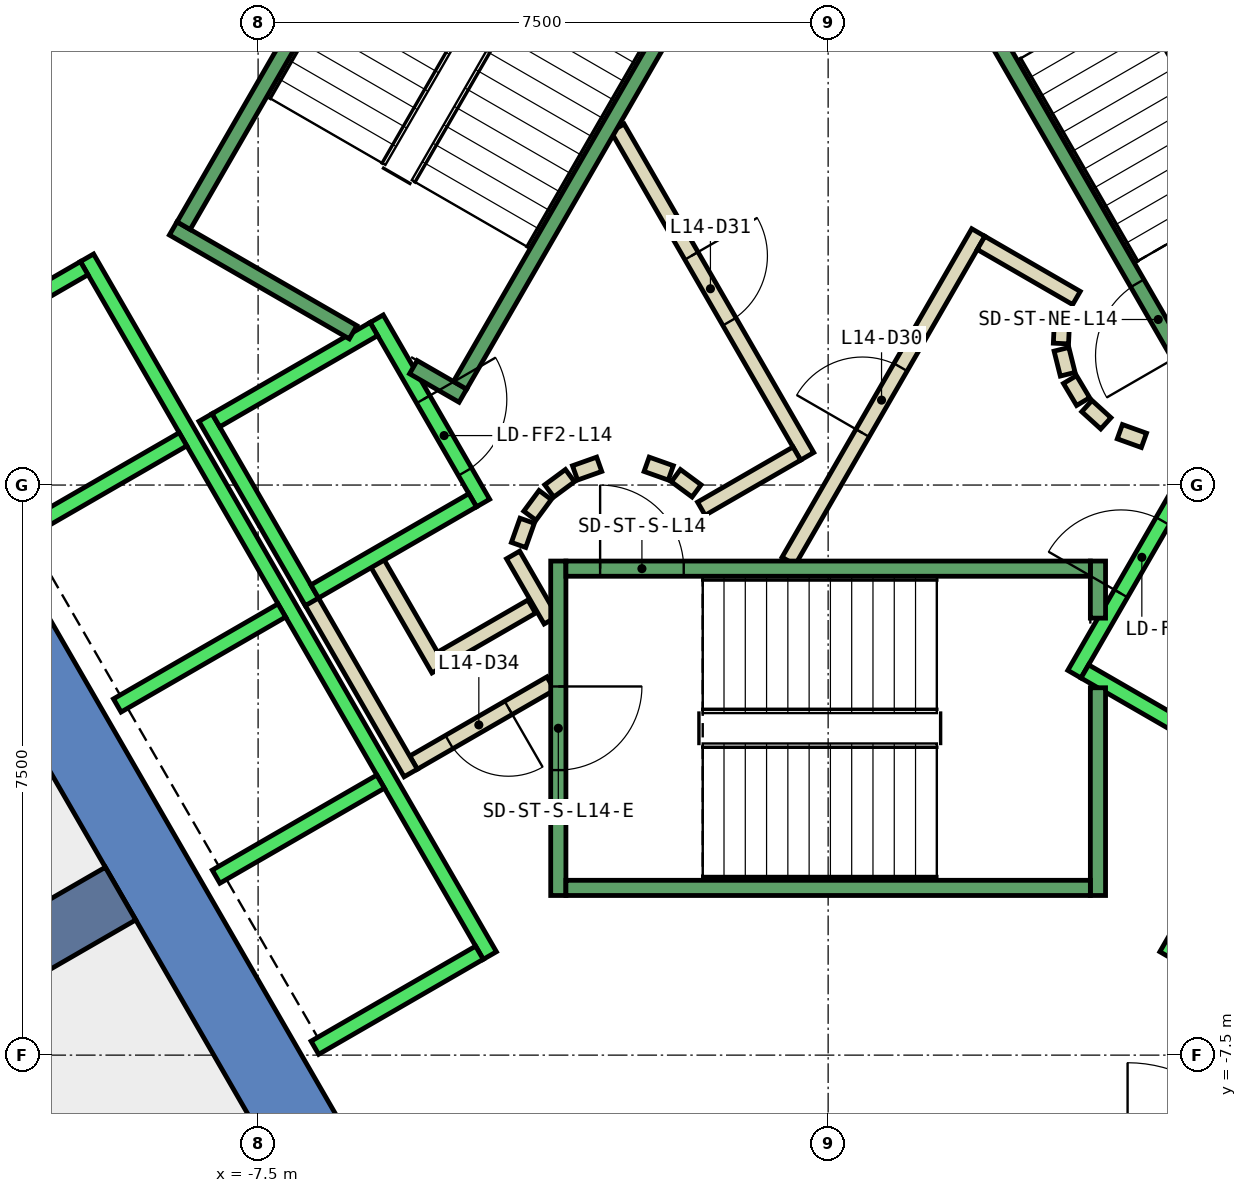
"""IFC4 building model, lengths in metres.
Left out: names, types, materials, properties, quantities, classifications, styles, units other than length and angle.
Written with IfcOpenShell. Run it as: python <this file> out.ifc"""

import sys

from ifc_helpers import new_model, si_unit, direction, frame, frame_2d, origin, place, context, subcontext, project, spatial, polyline, rectangle, outline, extrude, element, fill, save


model = new_model("IFC4")
c1 = context("Model", 3, precision=1e-05, world=origin(), true_north=direction((0.0, 1.0)))
c2 = subcontext(c1, "Body", "Model", "MODEL_VIEW")
j1 = project(units=[si_unit("LENGTHUNIT", "METRE"), si_unit("PLANEANGLEUNIT", "RADIAN")], contexts=[c1])
p1 = place(None, origin())
s1 = spatial("IfcSite", under=j1, at=p1, CompositionType="ELEMENT")
p2 = place(p1, origin())
s2 = spatial("IfcBuilding", under=s1, at=p2, CompositionType="ELEMENT")
p3 = place(p2, frame((0.0, 0.0, 68.6)))
s3 = spatial("IfcBuildingStorey", under=s2, at=p3, CompositionType="ELEMENT", Elevation=68.6)
p4 = place(p3, frame((0.0, 0.0, -0.4)))
e1 = element("IfcWall", 1, at=p4, inside=s3, PredefinedType="SHEAR", context=c2, shape_type="SweptSolid", body=[
    extrude(outline(polyline([(-12.267, 5.252), (-11.402, 4.752), (-6.351, 13.5), (-6.928, 14.5), (-12.267, 5.252)])), origin(), (0.0, 0.0, 1.0), 4.2),
])
p5 = place(p3, frame((0.0, 0.0, -0.4)))
e2 = element("IfcWall", 2, at=p5, inside=s3, PredefinedType="SHEAR", context=c2, shape_type="SweptSolid", body=[
    extrude(outline(polyline([(-13.856, 2.5), (-6.928, -9.5), (-6.351, -8.5), (-12.702, 2.5), (-13.856, 2.5)])), origin(), (0.0, 0.0, 1.0), 4.2),
])
p6 = place(p3, frame((-9.31, -5.375, -0.4), z_axis=(0.0, 0.0, 1.0), x_axis=(-0.866017533419, -0.500013631625, 0.0)))
e3 = element("IfcWall", 3, at=p6, inside=s3, PredefinedType="SHEAR", context=c2, shape_type="SweptSolid", body=[
    extrude(rectangle(XDim=9.0, YDim=0.8, at=frame_2d((4.5, 0.0))), origin(), (0.0, 0.0, 1.0), 4.2),
])
p7 = place(p3, frame((-3.9, -1.599, 0.0), z_axis=(0.0, 0.0, 1.0), x_axis=(-0.865969445389, -0.500096910261, 0.0)))
e4 = element("IfcWall", 4, at=p7, inside=s3, PredefinedType="PARTITIONING", context=c2, shape_type="SweptSolid", body=[
    extrude(rectangle(XDim=1.373, YDim=0.2, at=frame_2d((0.687, 0.0))), origin(), (0.0, 0.0, 1.0), 3.8),
])
p8 = place(p3, frame((-5.126, -2.422, 0.0), z_axis=(0.0, 0.0, 1.0), x_axis=(-0.500062241894, 0.865989465428, 0.0)))
e5 = element("IfcWall", 5, at=p8, inside=s3, PredefinedType="PARTITIONING", context=c2, shape_type="SweptSolid", body=[
    extrude(rectangle(XDim=1.7, YDim=0.2, at=frame_2d((0.85, 0.0))), origin(), (0.0, 0.0, 1.0), 3.8),
])
p9 = place(p3, frame((-3.65, -2.61, 0.0), z_axis=(0.0, 0.0, 1.0), x_axis=(-0.866072462134, -0.499918483688, 0.0)))
e6 = element("IfcWall", 6, at=p9, inside=s3, PredefinedType="PARTITIONING", context=c2, shape_type="SweptSolid", body=[
    extrude(rectangle(XDim=2.084, YDim=0.2, at=frame_2d((1.042, 0.0))), origin(), (0.0, 0.0, 1.0), 3.8),
])
p10 = place(p9, frame((0.642, 0.0, 0.0)))
e7 = element("IfcOpeningElement", 7, at=p10, cuts=e6, PredefinedType="OPENING", context=c2, shape_type="SweptSolid", body=[
    extrude(rectangle(XDim=0.9, YDim=2.1, at=frame_2d((0.45, 1.05))), frame((0.0, 0.11, 0.0), z_axis=(0.0, -1.0, 0.0), x_axis=(1.0, 0.0, 0.0)), (0.0, 0.0, 1.0), 0.22),
])
p11 = place(p3, frame((-5.492, -3.788, 0.0), z_axis=(0.0, 0.0, 1.0), x_axis=(-0.500008949224, 0.866020236886, 0.0)))
e8 = element("IfcWall", 8, at=p11, inside=s3, PredefinedType="PARTITIONING", context=c2, shape_type="SweptSolid", body=[
    extrude(rectangle(XDim=2.68, YDim=0.2, at=frame_2d((1.34, 0.0))), origin(), (0.0, 0.0, 1.0), 3.8),
])
p12 = place(p3, frame((-4.145, -0.92, 0.0), z_axis=(0.0, 0.0, 1.0), x_axis=(0.499743786207, -0.866173278362, 0.0)))
e9 = element("IfcWall", 9, at=p12, inside=s3, PredefinedType="PARTITIONING", context=c2, shape_type="SweptSolid", body=[
    extrude(rectangle(XDim=0.991, YDim=0.2, at=frame_2d((0.495, 0.0))), origin(), (0.0, 0.0, 1.0), 3.8),
])
p13 = place(p3, frame((-0.52, -1.0, 0.0), z_axis=(0.0, 0.0, 1.0), x_axis=(0.50011622646, 0.865958290007, 0.0)))
e10 = element("IfcWall", 10, at=p13, inside=s3, PredefinedType="PARTITIONING", context=c2, shape_type="SweptSolid", body=[
    extrude(rectangle(XDim=4.991, YDim=0.2, at=frame_2d((2.496, 0.0))), origin(), (0.0, 0.0, 1.0), 3.8),
])
p14 = place(p13, frame((1.945, 0.0, 0.0)))
e11 = element("IfcOpeningElement", 11, at=p14, cuts=e10, PredefinedType="OPENING", context=c2, shape_type="SweptSolid", body=[
    extrude(rectangle(XDim=1.0, YDim=2.1, at=frame_2d((0.5, 1.05))), frame((0.0, 0.11, 0.0), z_axis=(0.0, -1.0, 0.0), x_axis=(1.0, 0.0, 0.0)), (0.0, 0.0, 1.0), 0.22),
])
p15 = place(p3, frame((2.012, 3.186, 0.0), z_axis=(0.0, 0.0, 1.0), x_axis=(0.865891012941, -0.500232699559, 0.0)))
e12 = element("IfcWall", 12, at=p15, inside=s3, PredefinedType="PARTITIONING", context=c2, shape_type="SweptSolid", body=[
    extrude(rectangle(XDim=1.449, YDim=0.2, at=frame_2d((0.725, 0.0))), origin(), (0.0, 0.0, 1.0), 3.8),
])
p16 = place(p3, frame((3.079, 2.199, 0.0), z_axis=(0.0, 0.0, 1.0), x_axis=(-0.047771483479, -0.998858290933, 0.0)))
e13 = element("IfcWall", 13, at=p16, inside=s3, PredefinedType="PARTITIONING", context=c2, shape_type="SweptSolid", body=[
    extrude(rectangle(XDim=0.337, YDim=0.2, at=frame_2d((0.169, 0.0))), origin(), (0.0, 0.0, 1.0), 3.8),
])
p17 = place(p3, frame((3.07, 1.786, 0.0), z_axis=(0.0, 0.0, 1.0), x_axis=(0.242705583207, -0.970099994784, 0.0)))
e14 = element("IfcWall", 14, at=p17, inside=s3, PredefinedType="PARTITIONING", context=c2, shape_type="SweptSolid", body=[
    extrude(rectangle(XDim=0.338, YDim=0.2, at=frame_2d((0.169, 0.0))), origin(), (0.0, 0.0, 1.0), 3.8),
])
for number, where, z_axis, x_axis in (
    (15, (3.182, 1.388, 0.0), (0.0, 0.0, 1.0), (0.512, -0.859, 0.0)),
    (16, (3.404, 1.039, 0.0), (0.0, 0.0, 1.0), (0.74, -0.672, 0.0)),
):
    element("IfcWall", number, at=place(p3, frame(where, z_axis=z_axis, x_axis=x_axis)), inside=s3, PredefinedType="PARTITIONING", context=c2, shape_type="SweptSolid", body=[
        extrude(rectangle(XDim=0.338, YDim=0.2, at=frame_2d((0.169, 0.0))), origin(), (0.0, 0.0, 1.0), 3.8),
    ])
p18 = place(p3, frame((3.838, 0.702, 0.0), z_axis=(0.0, 0.0, 1.0), x_axis=(0.941035081519, -0.338308993895, 0.0)))
e17 = element("IfcWall", 17, at=p18, inside=s3, PredefinedType="PARTITIONING", context=c2, shape_type="SweptSolid", body=[
    extrude(rectangle(XDim=0.337, YDim=0.2, at=frame_2d((0.168, 0.0))), origin(), (0.0, 0.0, 1.0), 3.8),
])
p19 = place(p3, frame((-2.771, 4.7, 0.0), z_axis=(0.0, 0.0, 1.0), x_axis=(0.499969479948, -0.866043023828, 0.0)))
e18 = element("IfcWall", 18, at=p19, inside=s3, PredefinedType="PARTITIONING", context=c2, shape_type="SweptSolid", body=[
    extrude(rectangle(XDim=4.99, YDim=0.2, at=frame_2d((2.495, 0.0))), origin(), (0.0, 0.0, 1.0), 3.8),
])
p20 = place(p19, frame((1.945, 0.0, 0.0)))
e19 = element("IfcOpeningElement", 19, at=p20, cuts=e18, PredefinedType="OPENING", context=c2, shape_type="SweptSolid", body=[
    extrude(rectangle(XDim=1.0, YDim=2.1, at=frame_2d((0.5, 1.05))), frame((0.0, 0.11, 0.0), z_axis=(0.0, -1.0, 0.0), x_axis=(1.0, 0.0, 0.0)), (0.0, 0.0, 1.0), 0.22),
])
p21 = place(p3, frame((-0.412, 0.414, 0.0), z_axis=(0.0, 0.0, 1.0), x_axis=(-0.866017369001, -0.500013916395, 0.0)))
e20 = element("IfcWall", 20, at=p21, inside=s3, PredefinedType="PARTITIONING", context=c2, shape_type="SweptSolid", body=[
    extrude(rectangle(XDim=1.45, YDim=0.2, at=frame_2d((0.725, 0.0))), origin(), (0.0, 0.0, 1.0), 3.8),
])
p22 = place(p3, frame((-1.731, -0.077, 0.0), z_axis=(0.0, 0.0, 1.0), x_axis=(-0.804311165252, 0.594208338422, 0.0)))
e21 = element("IfcWall", 21, at=p22, inside=s3, PredefinedType="PARTITIONING", context=c2, shape_type="SweptSolid", body=[
    extrude(rectangle(XDim=0.338, YDim=0.2, at=frame_2d((0.169, 0.0))), origin(), (0.0, 0.0, 1.0), 3.8),
])
p23 = place(p3, frame((-2.07, 0.16, 0.0), z_axis=(0.0, 0.0, 1.0), x_axis=(-0.942199461132, 0.335052496547, 0.0)))
e22 = element("IfcWall", 22, at=p23, inside=s3, PredefinedType="PARTITIONING", context=c2, shape_type="SweptSolid", body=[
    extrude(rectangle(XDim=0.337, YDim=0.2, at=frame_2d((0.169, 0.0))), origin(), (0.0, 0.0, 1.0), 3.8),
])
p24 = place(p3, frame((-3.012, 0.273, 0.0), z_axis=(0.0, 0.0, 1.0), x_axis=(-0.942280615813, -0.334824194261, 0.0)))
e23 = element("IfcWall", 23, at=p24, inside=s3, PredefinedType="PARTITIONING", context=c2, shape_type="SweptSolid", body=[
    extrude(rectangle(XDim=0.338, YDim=0.2, at=frame_2d((0.169, 0.0))), origin(), (0.0, 0.0, 1.0), 3.8),
])
p25 = place(p3, frame((-3.397, 0.124, 0.0), z_axis=(0.0, 0.0, 1.0), x_axis=(-0.804311165252, -0.594208338422, 0.0)))
e24 = element("IfcWall", 24, at=p25, inside=s3, PredefinedType="PARTITIONING", context=c2, shape_type="SweptSolid", body=[
    extrude(rectangle(XDim=0.338, YDim=0.2, at=frame_2d((0.169, 0.0))), origin(), (0.0, 0.0, 1.0), 3.8),
])
p26 = place(p3, frame((-3.723, -0.131, 0.0), z_axis=(0.0, 0.0, 1.0), x_axis=(-0.594675113454, -0.803966112121, 0.0)))
e25 = element("IfcWall", 25, at=p26, inside=s3, PredefinedType="PARTITIONING", context=c2, shape_type="SweptSolid", body=[
    extrude(rectangle(XDim=0.338, YDim=0.2, at=frame_2d((0.169, 0.0))), origin(), (0.0, 0.0, 1.0), 3.8),
])
p27 = place(p3, frame((-3.96, -0.47, 0.0), z_axis=(0.0, 0.0, 1.0), x_axis=(-0.334824194261, -0.942280615813, 0.0)))
e26 = element("IfcWall", 26, at=p27, inside=s3, PredefinedType="PARTITIONING", context=c2, shape_type="SweptSolid", body=[
    extrude(rectangle(XDim=0.338, YDim=0.2, at=frame_2d((0.169, 0.0))), origin(), (0.0, 0.0, 1.0), 3.8),
])
p28 = place(p3, frame((-5.94, 2.188, 0.0), z_axis=(0.0, 0.0, 1.0), x_axis=(0.49994636267, -0.866056369097, 0.0)))
e27 = element("IfcWall", 27, at=p28, inside=s3, PredefinedType="STANDARD", context=c2, shape_type="SweptSolid", body=[
    extrude(rectangle(XDim=2.8, YDim=0.2, at=frame_2d((1.4, 0.0))), origin(), (0.0, 0.0, 1.0), 3.8),
])
p29 = place(p28, frame((1.225, 0.0, 0.0)))
e28 = element("IfcOpeningElement", 28, at=p29, cuts=e27, PredefinedType="OPENING", context=c2, shape_type="SweptSolid", body=[
    extrude(rectangle(XDim=1.1, YDim=2.1, at=frame_2d((0.55, 1.05))), frame((0.0, 0.11, 0.0), z_axis=(0.0, -1.0, 0.0), x_axis=(1.0, 0.0, 0.0)), (0.0, 0.0, 1.0), 0.22),
])
p30 = place(p3, frame((-8.192, 0.888, 0.0), z_axis=(0.0, 0.0, 1.0), x_axis=(0.49994636267, -0.866056369097, 0.0)))
e29 = element("IfcWall", 29, at=p30, inside=s3, PredefinedType="STANDARD", context=c2, shape_type="SweptSolid", body=[
    extrude(rectangle(XDim=2.8, YDim=0.2, at=frame_2d((1.4, 0.0))), origin(), (0.0, 0.0, 1.0), 3.8),
])
for number, where, z_axis, x_axis in (
    (30, (-5.977, 2.052, 0.0), (0.0, 0.0, 1.0), (-0.866, -0.5, 0.0)),
    (31, (-4.677, -0.2, 0.0), (0.0, 0.0, 1.0), (-0.866, -0.5, 0.0)),
):
    element("IfcWall", number, at=place(p3, frame(where, z_axis=z_axis, x_axis=x_axis)), inside=s3, PredefinedType="STANDARD", context=c2, shape_type="SweptSolid", body=[
        extrude(rectangle(XDim=2.399, YDim=0.2, at=frame_2d((1.2, 0.0))), origin(), (0.0, 0.0, 1.0), 3.8),
    ])
p31 = place(p3, frame((-9.751, 2.99, 0.0), z_axis=(0.0, 0.0, 1.0), x_axis=(0.50000090737, -0.866024879913, 0.0)))
e32 = element("IfcWall", 32, at=p31, inside=s3, PredefinedType="STANDARD", context=c2, shape_type="SweptSolid", body=[
    extrude(rectangle(XDim=10.6, YDim=0.2, at=frame_2d((5.3, 0.0))), origin(), (0.0, 0.0, 1.0), 3.8),
])
p32 = place(p3, frame((-9.788, 2.853, 0.0), z_axis=(0.0, 0.0, 1.0), x_axis=(-0.865998541277, -0.500046524342, 0.0)))
e33 = element("IfcWall", 33, at=p32, inside=s3, PredefinedType="STANDARD", context=c2, shape_type="SweptSolid", body=[
    extrude(rectangle(XDim=2.5, YDim=0.2, at=frame_2d((1.25, 0.0))), origin(), (0.0, 0.0, 1.0), 3.8),
])
for number, where, z_axis, x_axis in (
    (34, (-8.488, 0.602, 0.0), (0.0, 0.0, 1.0), (-0.866, -0.5, 0.0)),
    (35, (-7.188, -1.65, 0.0), (0.0, 0.0, 1.0), (-0.866, -0.5, 0.0)),
    (36, (-5.888, -3.902, 0.0), (0.0, 0.0, 1.0), (-0.866, -0.5, 0.0)),
    (37, (-4.588, -6.153, 0.0), (0.0, 0.0, 1.0), (-0.866, -0.5, 0.0)),
):
    element("IfcWall", number, at=place(p3, frame(where, z_axis=z_axis, x_axis=x_axis)), inside=s3, PredefinedType="STANDARD", context=c2, shape_type="SweptSolid", body=[
        extrude(rectangle(XDim=2.5, YDim=0.2, at=frame_2d((1.25, 0.0))), origin(), (0.0, 0.0, 1.0), 3.8),
    ])
p33 = place(p3, frame((3.24, -2.488, 0.0), z_axis=(0.0, 0.0, 1.0), x_axis=(0.49994636267, 0.866056369097, 0.0)))
e38 = element("IfcWall", 38, at=p33, inside=s3, PredefinedType="STANDARD", context=c2, shape_type="SweptSolid", body=[
    extrude(rectangle(XDim=2.8, YDim=0.2, at=frame_2d((1.4, 0.0))), origin(), (0.0, 0.0, 1.0), 3.8),
])
p34 = place(p33, frame((1.225, 0.0, 0.0)))
e39 = element("IfcOpeningElement", 39, at=p34, cuts=e38, PredefinedType="OPENING", context=c2, shape_type="SweptSolid", body=[
    extrude(rectangle(XDim=1.1, YDim=2.1, at=frame_2d((0.55, 1.05))), frame((0.0, 0.11, 0.0), z_axis=(0.0, -1.0, 0.0), x_axis=(1.0, 0.0, 0.0)), (0.0, 0.0, 1.0), 0.22),
])
p35 = place(p3, frame((3.377, -2.452, 0.0), z_axis=(0.0, 0.0, 1.0), x_axis=(0.865955154139, -0.50012165622, 0.0)))
e40 = element("IfcWall", 40, at=p35, inside=s3, PredefinedType="STANDARD", context=c2, shape_type="SweptSolid", body=[
    extrude(rectangle(XDim=2.4, YDim=0.2, at=frame_2d((1.2, 0.0))), origin(), (0.0, 0.0, 1.0), 3.8),
])
p36 = place(p3, frame((4.451, -6.19, 0.0), z_axis=(0.0, 0.0, 1.0), x_axis=(0.50000090737, 0.866024879913, 0.0)))
e41 = element("IfcWall", 41, at=p36, inside=s3, PredefinedType="STANDARD", context=c2, shape_type="SweptSolid", body=[
    extrude(rectangle(XDim=10.6, YDim=0.2, at=frame_2d((5.3, 0.0))), origin(), (0.0, 0.0, 1.0), 3.8),
])
p37 = place(p3, frame((-3.55, -1.0, 0.0), z_axis=(0.0, 0.0, 1.0), x_axis=(0.0, -1.0, 0.0)))
e42 = element("IfcWall", 42, at=p37, inside=s3, PredefinedType="STANDARD", context=c2, shape_type="SweptSolid", body=[
    extrude(rectangle(XDim=4.4, YDim=0.2, at=frame_2d((2.2, 0.0))), origin(), (0.0, 0.0, 1.0), 3.8),
])
p38 = place(p37, frame((1.65, 0.0, 0.0)))
e43 = element("IfcOpeningElement", 43, at=p38, cuts=e42, PredefinedType="OPENING", context=c2, shape_type="SweptSolid", body=[
    extrude(rectangle(XDim=1.1, YDim=2.2, at=frame_2d((0.55, 1.1))), frame((0.0, 0.11, 0.0), z_axis=(0.0, -1.0, 0.0), x_axis=(1.0, 0.0, 0.0)), (0.0, 0.0, 1.0), 0.22),
])
p39 = place(p3, frame((3.55, -2.667, 0.0), z_axis=(0.0, 0.0, 1.0), x_axis=(0.0, -1.0, 0.0)))
e44 = element("IfcWall", 44, at=p39, inside=s3, PredefinedType="STANDARD", context=c2, shape_type="SweptSolid", body=[
    extrude(rectangle(XDim=2.733, YDim=0.2, at=frame_2d((1.366, 0.0))), origin(), (0.0, 0.0, 1.0), 3.8),
])
p40 = place(p3, frame((3.55, -1.0, 0.0), z_axis=(0.0, 0.0, 1.0), x_axis=(0.0, -1.0, 0.0)))
e45 = element("IfcWall", 45, at=p40, inside=s3, PredefinedType="STANDARD", context=c2, shape_type="SweptSolid", body=[
    extrude(rectangle(XDim=0.751, YDim=0.2, at=frame_2d((0.375, 0.0))), origin(), (0.0, 0.0, 1.0), 3.8),
])
p41 = place(p3, frame((-3.45, -1.1, 0.0), z_axis=(0.0, 0.0, 1.0), x_axis=(1.0, 0.0, 0.0)))
e46 = element("IfcWall", 46, at=p41, inside=s3, PredefinedType="STANDARD", context=c2, shape_type="SweptSolid", body=[
    extrude(rectangle(XDim=6.9, YDim=0.2, at=frame_2d((3.45, 0.0))), origin(), (0.0, 0.0, 1.0), 3.8),
])
p42 = place(p41, frame((0.45, 0.0, 0.0)))
e47 = element("IfcOpeningElement", 47, at=p42, cuts=e46, PredefinedType="OPENING", context=c2, shape_type="SweptSolid", body=[
    extrude(rectangle(XDim=1.1, YDim=2.2, at=frame_2d((0.55, 1.1))), frame((0.0, 0.11, 0.0), z_axis=(0.0, -1.0, 0.0), x_axis=(1.0, 0.0, 0.0)), (0.0, 0.0, 1.0), 0.22),
])
p43 = place(p3, frame((-3.45, -5.3, 0.0), z_axis=(0.0, 0.0, 1.0), x_axis=(1.0, 0.0, 0.0)))
e48 = element("IfcWall", 48, at=p43, inside=s3, PredefinedType="STANDARD", context=c2, shape_type="SweptSolid", body=[
    extrude(rectangle(XDim=6.9, YDim=0.2, at=frame_2d((3.45, 0.0))), origin(), (0.0, 0.0, 1.0), 3.8),
])
p44 = place(p3, frame((4.843, 1.312, 0.0), z_axis=(0.0, 0.0, 1.0), x_axis=(-0.499963383562, 0.866046543262, 0.0)))
e49 = element("IfcWall", 49, at=p44, inside=s3, PredefinedType="STANDARD", context=c2, shape_type="SweptSolid", body=[
    extrude(rectangle(XDim=6.9, YDim=0.2, at=frame_2d((3.45, 0.0))), origin(), (0.0, 0.0, 1.0), 3.8),
])
p45 = place(p44, frame((0.45, 0.0, 0.0)))
e50 = element("IfcOpeningElement", 50, at=p45, cuts=e49, PredefinedType="OPENING", context=c2, shape_type="SweptSolid", body=[
    extrude(rectangle(XDim=1.1, YDim=2.2, at=frame_2d((0.55, 1.1))), frame((0.0, 0.11, 0.0), z_axis=(0.0, -1.0, 0.0), x_axis=(1.0, 0.0, 0.0)), (0.0, 0.0, 1.0), 0.22),
])
p46 = place(p3, frame((-6.25, 2.01, 0.0), z_axis=(0.0, 0.0, 1.0), x_axis=(-0.86611865017, 0.499838457731, 0.0)))
e51 = element("IfcWall", 51, at=p46, inside=s3, PredefinedType="STANDARD", context=c2, shape_type="SweptSolid", body=[
    extrude(rectangle(XDim=2.733, YDim=0.2, at=frame_2d((1.366, 0.0))), origin(), (0.0, 0.0, 1.0), 3.8),
])
p47 = place(p3, frame((-4.806, 1.176, 0.0), z_axis=(0.0, 0.0, 1.0), x_axis=(-0.866558586415, 0.499075361355, 0.0)))
e52 = element("IfcWall", 52, at=p47, inside=s3, PredefinedType="STANDARD", context=c2, shape_type="SweptSolid", body=[
    extrude(rectangle(XDim=0.751, YDim=0.2, at=frame_2d((0.376, 0.0))), origin(), (0.0, 0.0, 1.0), 3.8),
])
p48 = place(p3, frame((-1.393, 7.288, 0.0), z_axis=(0.0, 0.0, 1.0), x_axis=(-0.499963383562, -0.866046543262, 0.0)))
e53 = element("IfcWall", 53, at=p48, inside=s3, PredefinedType="STANDARD", context=c2, shape_type="SweptSolid", body=[
    extrude(rectangle(XDim=6.9, YDim=0.2, at=frame_2d((3.45, 0.0))), origin(), (0.0, 0.0, 1.0), 3.8),
])
p49 = place(p48, frame((0.45, 0.0, 0.0)))
e54 = element("IfcOpeningElement", 54, at=p49, cuts=e53, PredefinedType="OPENING", context=c2, shape_type="SweptSolid", body=[
    extrude(rectangle(XDim=1.1, YDim=2.2, at=frame_2d((0.55, 1.1))), frame((0.0, 0.11, 0.0), z_axis=(0.0, -1.0, 0.0), x_axis=(1.0, 0.0, 0.0)), (0.0, 0.0, 1.0), 0.22),
])
p50 = place(p3, frame((-5.03, 9.388, 0.0), z_axis=(0.0, 0.0, 1.0), x_axis=(-0.499978703459, -0.866037698999, 0.0)))
e55 = element("IfcWall", 55, at=p50, inside=s3, PredefinedType="STANDARD", context=c2, shape_type="SweptSolid", body=[
    extrude(rectangle(XDim=6.9, YDim=0.2, at=frame_2d((3.45, 0.0))), origin(), (0.0, 0.0, 1.0), 3.8),
])
p51 = place(p14, origin())
e56 = element("IfcDoor", 56, at=p51, inside=s3, OperationType="SINGLE_SWING_LEFT", PredefinedType="DOOR", context=c2, shape_type="SweptSolid", body=[
    extrude(rectangle(XDim=1.0, YDim=2.1, at=frame_2d((0.5, 1.05))), frame((0.0, 0.025, 0.0), z_axis=(0.0, -1.0, 0.0), x_axis=(1.0, 0.0, 0.0)), (0.0, 0.0, 1.0), 0.05),
])
fill(e11, e56)
p52 = place(p20, origin())
e57 = element("IfcDoor", 57, at=p52, inside=s3, OperationType="SINGLE_SWING_RIGHT", PredefinedType="DOOR", context=c2, shape_type="SweptSolid", body=[
    extrude(rectangle(XDim=1.0, YDim=2.1, at=frame_2d((0.5, 1.05))), frame((0.0, 0.025, 0.0), z_axis=(0.0, -1.0, 0.0), x_axis=(1.0, 0.0, 0.0)), (0.0, 0.0, 1.0), 0.05),
])
fill(e19, e57)
p53 = place(p10, origin())
e58 = element("IfcDoor", 58, at=p53, inside=s3, OperationType="SINGLE_SWING_LEFT", PredefinedType="DOOR", context=c2, shape_type="SweptSolid", body=[
    extrude(rectangle(XDim=0.9, YDim=2.1, at=frame_2d((0.45, 1.05))), frame((0.0, 0.025, 0.0), z_axis=(0.0, -1.0, 0.0), x_axis=(1.0, 0.0, 0.0)), (0.0, 0.0, 1.0), 0.05),
])
fill(e7, e58)
p54 = place(p34, origin())
e59 = element("IfcDoor", 59, at=p54, inside=s3, OperationType="SLIDING_TO_LEFT", PredefinedType="DOOR", context=c2, shape_type="SweptSolid", body=[
    extrude(rectangle(XDim=1.1, YDim=2.1, at=frame_2d((0.55, 1.05))), frame((0.0, 0.025, 0.0), z_axis=(0.0, -1.0, 0.0), x_axis=(1.0, 0.0, 0.0)), (0.0, 0.0, 1.0), 0.05),
])
fill(e39, e59)
p55 = place(p29, origin())
e60 = element("IfcDoor", 60, at=p55, inside=s3, OperationType="SLIDING_TO_LEFT", PredefinedType="DOOR", context=c2, shape_type="SweptSolid", body=[
    extrude(rectangle(XDim=1.1, YDim=2.1, at=frame_2d((0.55, 1.05))), frame((0.0, 0.025, 0.0), z_axis=(0.0, -1.0, 0.0), x_axis=(1.0, 0.0, 0.0)), (0.0, 0.0, 1.0), 0.05),
])
fill(e28, e60)
p56 = place(p42, origin())
e61 = element("IfcDoor", 61, at=p56, inside=s3, OperationType="SINGLE_SWING_LEFT", PredefinedType="DOOR", context=c2, shape_type="SweptSolid", body=[
    extrude(rectangle(XDim=1.1, YDim=2.2, at=frame_2d((0.55, 1.1))), frame((0.0, 0.025, 0.0), z_axis=(0.0, -1.0, 0.0), x_axis=(1.0, 0.0, 0.0)), (0.0, 0.0, 1.0), 0.05),
])
fill(e47, e61)
p57 = place(p38, origin())
e62 = element("IfcDoor", 62, at=p57, inside=s3, OperationType="SINGLE_SWING_LEFT", PredefinedType="DOOR", context=c2, shape_type="SweptSolid", body=[
    extrude(rectangle(XDim=1.1, YDim=2.2, at=frame_2d((0.55, 1.1))), frame((0.0, 0.025, 0.0), z_axis=(0.0, -1.0, 0.0), x_axis=(1.0, 0.0, 0.0)), (0.0, 0.0, 1.0), 0.05),
])
fill(e43, e62)
p58 = place(p45, origin())
e63 = element("IfcDoor", 63, at=p58, inside=s3, OperationType="SINGLE_SWING_LEFT", PredefinedType="DOOR", context=c2, shape_type="SweptSolid", body=[
    extrude(rectangle(XDim=1.1, YDim=2.2, at=frame_2d((0.55, 1.1))), frame((0.0, 0.025, 0.0), z_axis=(0.0, -1.0, 0.0), x_axis=(1.0, 0.0, 0.0)), (0.0, 0.0, 1.0), 0.05),
])
fill(e50, e63)
save(model, sys.argv[1])
